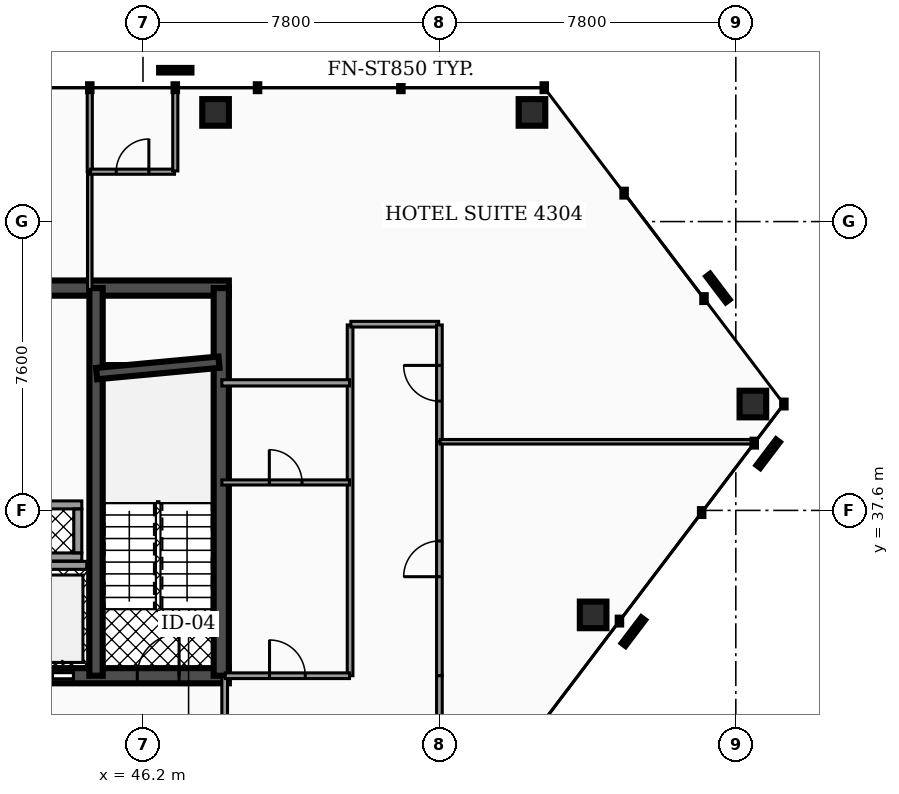
"""IFC4 building model, lengths in metres.
Left out: names, types, materials, properties, quantities, classifications, styles, units other than length and angle.
Written with IfcOpenShell. Run it as: python <this file> out.ifc"""

import sys

from ifc_helpers import new_model, si_unit, direction, frame, frame_2d, origin, origin_2d, place, context, subcontext, project, spatial, rectangle, hollow_rectangle, extrude, element, fill, save


model = new_model("IFC4")
c1 = context("Model", 3, precision=1e-05, world=origin(), true_north=direction((0.0, 1.0)))
c2 = subcontext(c1, "Body", "Model", "MODEL_VIEW")
j1 = project(units=[si_unit("LENGTHUNIT", "METRE"), si_unit("PLANEANGLEUNIT", "RADIAN")], contexts=[c1])
p1 = place(None, origin())
s1 = spatial("IfcSite", under=j1, at=p1, CompositionType="ELEMENT")
p2 = place(p1, origin())
s2 = spatial("IfcBuilding", under=s1, at=p2, CompositionType="ELEMENT")
p3 = place(p2, frame((0.0, 0.0, 175.78)))
s3 = spatial("IfcBuildingStorey", under=s2, at=p3, CompositionType="ELEMENT", Elevation=175.78)
p4 = place(p3, frame((28.4, 43.45, 0.0), z_axis=(0.0, 0.0, 1.0), x_axis=(1.0, 0.0, 0.0)))
e1 = element("IfcWall", 1, at=p4, inside=s3, PredefinedType="SHEAR", context=c2, shape_type="SweptSolid", body=[
    extrude(rectangle(XDim=20.06, YDim=0.4, at=frame_2d((10.03, 0.0))), origin(), (0.0, 0.0, 1.0), 3.5),
])
p5 = place(p3, frame((28.4, 33.25, 0.0), z_axis=(0.0, 0.0, 1.0), x_axis=(1.0, 0.0, 0.0)))
e2 = element("IfcWall", 2, at=p5, inside=s3, PredefinedType="SHEAR", context=c2, shape_type="SweptSolid", body=[
    extrude(rectangle(XDim=20.06, YDim=0.4, at=frame_2d((10.03, 0.0))), origin(), (0.0, 0.0, 1.0), 3.5),
])
p6 = place(p5, frame((4.03, 0.0, 0.0)))
e3 = element("IfcOpeningElement", 3, at=p6, cuts=e2, PredefinedType="OPENING", context=c2, shape_type="SweptSolid", body=[
    extrude(rectangle(XDim=1.1, YDim=2.15, at=frame_2d((0.55, 1.075))), frame((0.0, 0.21, 0.0), z_axis=(0.0, -1.0, 0.0), x_axis=(1.0, 0.0, 0.0)), (0.0, 0.0, 1.0), 0.42),
])
p7 = place(p5, frame((14.87, 0.0, 0.0)))
e4 = element("IfcOpeningElement", 4, at=p7, cuts=e2, PredefinedType="OPENING", context=c2, shape_type="SweptSolid", body=[
    extrude(rectangle(XDim=1.1, YDim=2.15, at=frame_2d((0.55, 1.075))), frame((0.0, 0.21, 0.0), z_axis=(0.0, -1.0, 0.0), x_axis=(1.0, 0.0, 0.0)), (0.0, 0.0, 1.0), 0.42),
])
p8 = place(p5, frame((5.95, 0.0, 0.0)))
e5 = element("IfcOpeningElement", 5, at=p8, cuts=e2, PredefinedType="OPENING", context=c2, shape_type="SweptSolid", body=[
    extrude(rectangle(XDim=1.0, YDim=2.1, at=frame_2d((0.5, 1.05))), frame((0.0, 0.21, 0.0), z_axis=(0.0, -1.0, 0.0), x_axis=(1.0, 0.0, 0.0)), (0.0, 0.0, 1.0), 0.42),
])
p9 = place(p5, frame((7.65, 0.0, 0.0)))
e6 = element("IfcOpeningElement", 6, at=p9, cuts=e2, PredefinedType="OPENING", context=c2, shape_type="SweptSolid", body=[
    extrude(rectangle(XDim=1.0, YDim=2.1, at=frame_2d((0.5, 1.05))), frame((0.0, 0.21, 0.0), z_axis=(0.0, -1.0, 0.0), x_axis=(1.0, 0.0, 0.0)), (0.0, 0.0, 1.0), 0.42),
])
p10 = place(p5, frame((1.31, 0.0, 0.0)))
e7 = element("IfcOpeningElement", 7, at=p10, cuts=e2, PredefinedType="OPENING", context=c2, shape_type="SweptSolid", body=[
    extrude(rectangle(XDim=1.1, YDim=2.2, at=frame_2d((0.55, 1.1))), frame((0.0, 0.21, 0.0), z_axis=(0.0, -1.0, 0.0), x_axis=(1.0, 0.0, 0.0)), (0.0, 0.0, 1.0), 0.42),
])
p11 = place(p5, frame((9.44, 0.0, 0.0)))
e8 = element("IfcOpeningElement", 8, at=p11, cuts=e2, PredefinedType="OPENING", context=c2, shape_type="SweptSolid", body=[
    extrude(rectangle(XDim=1.12, YDim=2.05, at=frame_2d((0.56, 1.025))), frame((0.0, 0.21, 0.0), z_axis=(0.0, -1.0, 0.0), x_axis=(1.0, 0.0, 0.0)), (0.0, 0.0, 1.0), 0.42),
])
p12 = place(p5, frame((17.65, 0.0, 0.0)))
e9 = element("IfcOpeningElement", 9, at=p12, cuts=e2, PredefinedType="OPENING", context=c2, shape_type="SweptSolid", body=[
    extrude(rectangle(XDim=1.1, YDim=2.2, at=frame_2d((0.55, 1.1))), frame((0.0, 0.21, 0.0), z_axis=(0.0, -1.0, 0.0), x_axis=(1.0, 0.0, 0.0)), (0.0, 0.0, 1.0), 0.42),
])
p13 = place(p3, frame((44.965, 33.25, 0.0), z_axis=(0.0, 0.0, 1.0), x_axis=(0.0, 1.0, 0.0)))
e10 = element("IfcWall", 10, at=p13, inside=s3, PredefinedType="SHEAR", context=c2, shape_type="SweptSolid", body=[
    extrude(rectangle(XDim=10.2, YDim=0.35, at=frame_2d((5.1, 0.0))), origin(), (0.0, 0.0, 1.0), 3.5),
])
p14 = place(p3, frame((48.26, 33.25, 0.0), z_axis=(0.0, 0.0, 1.0), x_axis=(0.0, 1.0, 0.0)))
e11 = element("IfcWall", 11, at=p14, inside=s3, PredefinedType="SHEAR", context=c2, shape_type="SweptSolid", body=[
    extrude(rectangle(XDim=10.2, YDim=0.4, at=frame_2d((5.1, 0.0))), origin(), (0.0, 0.0, 1.0), 3.5),
])
p15 = place(p3, frame((44.98, 41.2, 0.0), z_axis=(0.0, 0.0, 1.0), x_axis=(0.995686468965, 0.09278176286, 0.0)))
e12 = element("IfcWall", 12, at=p15, inside=s3, PredefinedType="SHEAR", context=c2, shape_type="SweptSolid", body=[
    extrude(rectangle(XDim=3.234, YDim=0.3, at=frame_2d((1.617, 0.0))), origin(), (0.0, 0.0, 1.0), 3.5),
])
for number, where, z_axis, x_axis in (
    (13, (56.436, 48.072, 0.0), (0.0, 0.0, 1.0), (1.0, 0.0, 0.0)),
    (14, (48.11, 48.072, 0.0), (0.0, 0.0, 1.0), (1.0, 0.0, 0.0)),
    (15, (58.045, 34.851, 0.0), (0.0, 0.0, 1.0), (1.0, 0.0, 0.0)),
    (16, (62.249, 40.399, 0.0), (0.0, 0.0, 1.0), (1.0, 0.0, 0.0)),
):
    element("IfcColumn", number, at=place(p3, frame(where, z_axis=z_axis, x_axis=x_axis)), inside=s3, PredefinedType="COLUMN", context=c2, shape_type="SweptSolid", body=[
        extrude(hollow_rectangle(XDim=0.7, YDim=0.7, WallThickness=0.035, at=origin_2d()), origin(), (0.0, 0.0, 1.0), 3.5),
    ])
p16 = place(p3, frame((42.92, 36.155, 0.0), z_axis=(0.0, 0.0, 1.0), x_axis=(1.0, 0.0, 0.0)))
e17 = element("IfcWall", 17, at=p16, inside=s3, PredefinedType="SOLIDWALL", context=c2, shape_type="SweptSolid", body=[
    extrude(rectangle(XDim=1.8, YDim=0.21, at=frame_2d((0.9, 0.0))), origin(), (0.0, 0.0, 1.0), 2.472),
])
for number, where, z_axis, x_axis in (
    (18, (42.99, 36.375, 0.0), (0.0, 0.0, 1.0), (1.0, 0.0, 0.0)),
    (19, (42.99, 37.745, 0.0), (0.0, 0.0, 1.0), (1.0, 0.0, 0.0)),
):
    element("IfcWall", number, at=place(p3, frame(where, z_axis=z_axis, x_axis=x_axis)), inside=s3, PredefinedType="SOLIDWALL", context=c2, shape_type="SweptSolid", body=[
        extrude(rectangle(XDim=1.6, YDim=0.21, at=frame_2d((0.8, 0.0))), origin(), (0.0, 0.0, 1.0), 3.5),
    ])
p17 = place(p3, frame((44.485, 36.485, 0.0), z_axis=(0.0, 0.0, 1.0), x_axis=(0.0, 1.0, 0.0)))
e20 = element("IfcWall", 20, at=p17, inside=s3, PredefinedType="SOLIDWALL", context=c2, shape_type="SweptSolid", body=[
    extrude(rectangle(XDim=1.15, YDim=0.21, at=frame_2d((0.575, 0.0))), origin(), (0.0, 0.0, 1.0), 3.5),
])
p18 = place(p3, frame((48.35, 30.17, 0.0), z_axis=(0.0, 0.0, 1.0), x_axis=(0.0, 1.0, 0.0)))
e21 = element("IfcWall", 21, at=p18, inside=s3, PredefinedType="PARTITIONING", context=c2, shape_type="SweptSolid", body=[
    extrude(rectangle(XDim=3.06, YDim=0.15, at=frame_2d((1.53, 0.0))), origin(), (0.0, 0.0, 1.0), 2.457),
])
p19 = place(p18, frame((1.06, 0.0, 0.0)))
e22 = element("IfcOpeningElement", 22, at=p19, cuts=e21, PredefinedType="OPENING", context=c2, shape_type="SweptSolid", body=[
    extrude(rectangle(XDim=0.94, YDim=2.05, at=frame_2d((0.47, 1.025))), frame((0.0, 0.085, 0.0), z_axis=(0.0, -1.0, 0.0), x_axis=(1.0, 0.0, 0.0)), (0.0, 0.0, 1.0), 0.17),
])
p20 = place(p3, frame((54.0, 33.25, 0.0), z_axis=(0.0, 0.0, 1.0), x_axis=(0.0, 1.0, 0.0)))
e23 = element("IfcWall", 23, at=p20, inside=s3, PredefinedType="PARTITIONING", context=c2, shape_type="SweptSolid", body=[
    extrude(rectangle(XDim=6.151, YDim=0.15, at=frame_2d((3.076, 0.0))), origin(), (0.0, 0.0, 1.0), 2.457),
])
p21 = place(p20, frame((2.606, 0.0, 0.0)))
e24 = element("IfcOpeningElement", 24, at=p21, cuts=e23, PredefinedType="OPENING", context=c2, shape_type="SweptSolid", body=[
    extrude(rectangle(XDim=0.94, YDim=2.05, at=frame_2d((0.47, 1.025))), frame((0.0, 0.085, 0.0), z_axis=(0.0, -1.0, 0.0), x_axis=(1.0, 0.0, 0.0)), (0.0, 0.0, 1.0), 0.17),
])
p22 = place(p3, frame((54.0, 32.197, 0.0), z_axis=(0.0, 0.0, 1.0), x_axis=(0.0, 1.0, 0.0)))
e25 = element("IfcWall", 25, at=p22, inside=s3, PredefinedType="PARTITIONING", context=c2, shape_type="SweptSolid", body=[
    extrude(rectangle(XDim=1.053, YDim=0.15, at=frame_2d((0.527, 0.0))), origin(), (0.0, 0.0, 1.0), 2.457),
])
p23 = place(p3, frame((51.65, 33.25, 0.0), z_axis=(0.0, 0.0, 1.0), x_axis=(0.0, 1.0, 0.0)))
e26 = element("IfcWall", 26, at=p23, inside=s3, PredefinedType="PARTITIONING", context=c2, shape_type="SweptSolid", body=[
    extrude(rectangle(XDim=9.23, YDim=0.15, at=frame_2d((4.615, 0.0))), origin(), (0.0, 0.0, 1.0), 2.457),
])
p24 = place(p3, frame((51.67, 42.5, 0.0), z_axis=(0.0, 0.0, 1.0), x_axis=(1.0, 0.0, 0.0)))
e27 = element("IfcWall", 27, at=p24, inside=s3, PredefinedType="PARTITIONING", context=c2, shape_type="SweptSolid", body=[
    extrude(rectangle(XDim=2.31, YDim=0.15, at=frame_2d((1.155, 0.0))), origin(), (0.0, 0.0, 1.0), 2.457),
])
p25 = place(p3, frame((54.0, 39.411, 0.0), z_axis=(0.0, 0.0, 1.0), x_axis=(0.0, 1.0, 0.0)))
e28 = element("IfcWall", 28, at=p25, inside=s3, PredefinedType="PARTITIONING", context=c2, shape_type="SweptSolid", body=[
    extrude(rectangle(XDim=3.069, YDim=0.15, at=frame_2d((1.534, 0.0))), origin(), (0.0, 0.0, 1.0), 2.457),
])
p26 = place(p25, frame((1.064, 0.0, 0.0)))
e29 = element("IfcOpeningElement", 29, at=p26, cuts=e28, PredefinedType="OPENING", context=c2, shape_type="SweptSolid", body=[
    extrude(rectangle(XDim=0.94, YDim=2.05, at=frame_2d((0.47, 1.025))), frame((0.0, 0.085, 0.0), z_axis=(0.0, -1.0, 0.0), x_axis=(1.0, 0.0, 0.0)), (0.0, 0.0, 1.0), 0.17),
])
p27 = place(p3, frame((48.365, 33.25, 0.0), z_axis=(0.0, 0.0, 1.0), x_axis=(1.0, 0.0, 0.0)))
e30 = element("IfcWall", 30, at=p27, inside=s3, PredefinedType="PARTITIONING", context=c2, shape_type="SweptSolid", body=[
    extrude(rectangle(XDim=3.27, YDim=0.15, at=frame_2d((1.635, 0.0))), origin(), (0.0, 0.0, 1.0), 2.457),
])
p28 = place(p27, frame((1.165, 0.0, 0.0)))
e31 = element("IfcOpeningElement", 31, at=p28, cuts=e30, PredefinedType="OPENING", context=c2, shape_type="SweptSolid", body=[
    extrude(rectangle(XDim=0.94, YDim=2.05, at=frame_2d((0.47, 1.025))), frame((0.0, 0.085, 0.0), z_axis=(0.0, -1.0, 0.0), x_axis=(1.0, 0.0, 0.0)), (0.0, 0.0, 1.0), 0.17),
])
p29 = place(p3, frame((44.8, 43.415, 0.0), z_axis=(0.0, 0.0, 1.0), x_axis=(0.0, 1.0, 0.0)))
e32 = element("IfcWall", 32, at=p29, inside=s3, PredefinedType="PARTITIONING", context=c2, shape_type="SweptSolid", body=[
    extrude(rectangle(XDim=3.092, YDim=0.12, at=frame_2d((1.546, 0.0))), origin(), (0.0, 0.0, 1.0), 2.457),
])
p30 = place(p3, frame((44.8, 46.517, 0.0), z_axis=(0.0, 0.0, 1.0), x_axis=(0.0, 1.0, 0.0)))
e33 = element("IfcWall", 33, at=p30, inside=s3, PredefinedType="PARTITIONING", context=c2, shape_type="SweptSolid", body=[
    extrude(rectangle(XDim=2.19, YDim=0.135, at=frame_2d((1.095, 0.0))), origin(), (0.0, 0.0, 1.0), 2.457),
])
p31 = place(p3, frame((54.02, 39.406, 0.0), z_axis=(0.0, 0.0, 1.0), x_axis=(1.0, 0.0, 0.0)))
e34 = element("IfcWall", 34, at=p31, inside=s3, PredefinedType="PARTITIONING", context=c2, shape_type="SweptSolid", body=[
    extrude(rectangle(XDim=8.277, YDim=0.12, at=frame_2d((4.139, 0.0))), origin(), (0.0, 0.0, 1.0), 2.457),
])
p32 = place(p3, frame((44.82, 46.512, 0.0), z_axis=(0.0, 0.0, 1.0), x_axis=(1.0, 0.0, 0.0)))
e35 = element("IfcWall", 35, at=p32, inside=s3, PredefinedType="PARTITIONING", context=c2, shape_type="SweptSolid", body=[
    extrude(rectangle(XDim=2.21, YDim=0.135, at=frame_2d((1.105, 0.0))), origin(), (0.0, 0.0, 1.0), 2.457),
])
p33 = place(p32, frame((0.675, 0.0, 0.0)))
e36 = element("IfcOpeningElement", 36, at=p33, cuts=e35, PredefinedType="OPENING", context=c2, shape_type="SweptSolid", body=[
    extrude(rectangle(XDim=0.86, YDim=2.05, at=frame_2d((0.43, 1.025))), frame((0.0, 0.077, 0.0), z_axis=(0.0, -1.0, 0.0), x_axis=(1.0, 0.0, 0.0)), (0.0, 0.0, 1.0), 0.155),
])
p34 = place(p3, frame((47.05, 46.532, 0.0), z_axis=(0.0, 0.0, 1.0), x_axis=(0.0, 1.0, 0.0)))
e37 = element("IfcWall", 37, at=p34, inside=s3, PredefinedType="PARTITIONING", context=c2, shape_type="SweptSolid", body=[
    extrude(rectangle(XDim=2.175, YDim=0.135, at=frame_2d((1.087, 0.0))), origin(), (0.0, 0.0, 1.0), 2.457),
])
p35 = place(p3, frame((48.275, 40.956, 0.0), z_axis=(0.0, 0.0, 1.0), x_axis=(1.0, 0.0, 0.0)))
e38 = element("IfcWall", 38, at=p35, inside=s3, PredefinedType="PARTITIONING", context=c2, shape_type="SweptSolid", body=[
    extrude(rectangle(XDim=3.36, YDim=0.165, at=frame_2d((1.68, 0.0))), origin(), (0.0, 0.0, 1.0), 2.457),
])
p36 = place(p3, frame((48.275, 38.336, 0.0), z_axis=(0.0, 0.0, 1.0), x_axis=(1.0, 0.0, 0.0)))
e39 = element("IfcWall", 39, at=p36, inside=s3, PredefinedType="PARTITIONING", context=c2, shape_type="SweptSolid", body=[
    extrude(rectangle(XDim=3.36, YDim=0.135, at=frame_2d((1.68, 0.0))), origin(), (0.0, 0.0, 1.0), 2.457),
])
p37 = place(p36, frame((1.25, 0.0, 0.0)))
e40 = element("IfcOpeningElement", 40, at=p37, cuts=e39, PredefinedType="OPENING", context=c2, shape_type="SweptSolid", body=[
    extrude(rectangle(XDim=0.86, YDim=2.05, at=frame_2d((0.43, 1.025))), frame((0.0, 0.077, 0.0), z_axis=(0.0, -1.0, 0.0), x_axis=(1.0, 0.0, 0.0)), (0.0, 0.0, 1.0), 0.155),
])
p38 = place(p7, origin())
e41 = element("IfcDoor", 41, at=p38, inside=s3, OperationType="SLIDING_TO_RIGHT", PredefinedType="DOOR", context=c2, shape_type="SweptSolid", body=[
    extrude(rectangle(XDim=1.1, YDim=2.15, at=frame_2d((0.55, 1.075))), frame((0.0, 0.025, 0.0), z_axis=(0.0, -1.0, 0.0), x_axis=(1.0, 0.0, 0.0)), (0.0, 0.0, 1.0), 0.05),
])
fill(e4, e41)
p39 = place(p12, origin())
e42 = element("IfcDoor", 42, at=p39, inside=s3, OperationType="SINGLE_SWING_RIGHT", PredefinedType="DOOR", context=c2, shape_type="SweptSolid", body=[
    extrude(rectangle(XDim=1.1, YDim=2.2, at=frame_2d((0.55, 1.1))), frame((0.0, 0.025, 0.0), z_axis=(0.0, -1.0, 0.0), x_axis=(1.0, 0.0, 0.0)), (0.0, 0.0, 1.0), 0.05),
])
fill(e9, e42)
p40 = place(p21, origin())
e43 = element("IfcDoor", 43, at=p40, inside=s3, OperationType="SINGLE_SWING_LEFT", PredefinedType="DOOR", context=c2, shape_type="SweptSolid", body=[
    extrude(rectangle(XDim=0.94, YDim=2.05, at=frame_2d((0.47, 1.025))), frame((0.0, 0.025, 0.0), z_axis=(0.0, -1.0, 0.0), x_axis=(1.0, 0.0, 0.0)), (0.0, 0.0, 1.0), 0.05),
])
fill(e24, e43)
p41 = place(p26, origin())
e44 = element("IfcDoor", 44, at=p41, inside=s3, OperationType="SINGLE_SWING_RIGHT", PredefinedType="DOOR", context=c2, shape_type="SweptSolid", body=[
    extrude(rectangle(XDim=0.94, YDim=2.05, at=frame_2d((0.47, 1.025))), frame((0.0, 0.025, 0.0), z_axis=(0.0, -1.0, 0.0), x_axis=(1.0, 0.0, 0.0)), (0.0, 0.0, 1.0), 0.05),
])
fill(e29, e44)
p42 = place(p28, origin())
e45 = element("IfcDoor", 45, at=p42, inside=s3, OperationType="SINGLE_SWING_LEFT", PredefinedType="DOOR", context=c2, shape_type="SweptSolid", body=[
    extrude(rectangle(XDim=0.94, YDim=2.05, at=frame_2d((0.47, 1.025))), frame((0.0, 0.025, 0.0), z_axis=(0.0, -1.0, 0.0), x_axis=(1.0, 0.0, 0.0)), (0.0, 0.0, 1.0), 0.05),
])
fill(e31, e45)
p43 = place(p33, origin())
e46 = element("IfcDoor", 46, at=p43, inside=s3, OperationType="SINGLE_SWING_RIGHT", PredefinedType="DOOR", context=c2, shape_type="SweptSolid", body=[
    extrude(rectangle(XDim=0.86, YDim=2.05, at=frame_2d((0.43, 1.025))), frame((0.0, 0.025, 0.0), z_axis=(0.0, -1.0, 0.0), x_axis=(1.0, 0.0, 0.0)), (0.0, 0.0, 1.0), 0.05),
])
fill(e36, e46)
p44 = place(p37, origin())
e47 = element("IfcDoor", 47, at=p44, inside=s3, OperationType="SINGLE_SWING_LEFT", PredefinedType="DOOR", context=c2, shape_type="SweptSolid", body=[
    extrude(rectangle(XDim=0.86, YDim=2.05, at=frame_2d((0.43, 1.025))), frame((0.0, 0.025, 0.0), z_axis=(0.0, -1.0, 0.0), x_axis=(1.0, 0.0, 0.0)), (0.0, 0.0, 1.0), 0.05),
])
fill(e40, e47)
save(model, sys.argv[1])
